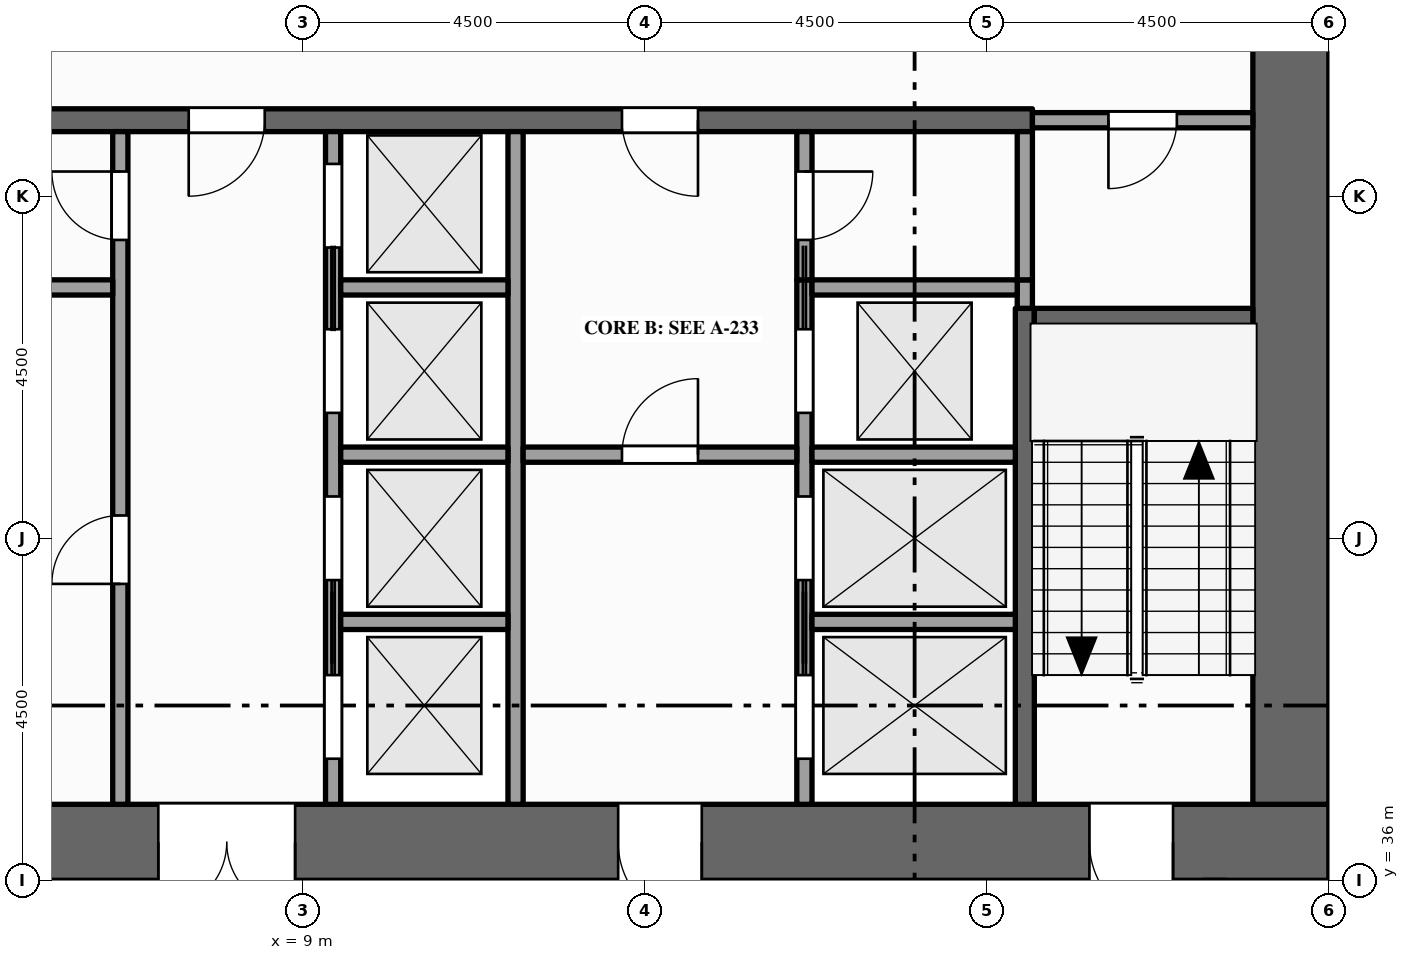
"""IFC4 building model, lengths in metres.
Left out: names, types, materials, properties, quantities, classifications, styles, units other than length and angle.
Written with IfcOpenShell. Run it as: python <this file> out.ifc"""

import sys

from ifc_helpers import new_model, si_unit, direction, frame, frame_2d, origin, place, context, subcontext, project, spatial, rectangle, extrude, element, fill, save


model = new_model("IFC4")
c1 = context("Model", 3, precision=1e-05, world=origin(), true_north=direction((0.0, 1.0)))
c2 = subcontext(c1, "Body", "Model", "MODEL_VIEW")
j1 = project(units=[si_unit("LENGTHUNIT", "METRE"), si_unit("PLANEANGLEUNIT", "RADIAN")], contexts=[c1])
p1 = place(None, origin())
s1 = spatial("IfcSite", under=j1, at=p1, CompositionType="ELEMENT")
p2 = place(p1, origin())
s2 = spatial("IfcBuilding", under=s1, at=p2, CompositionType="ELEMENT")
p3 = place(p2, frame((0.0, 0.0, 183.0)))
s3 = spatial("IfcBuildingStorey", under=s2, at=p3, CompositionType="ELEMENT", Elevation=183.0)
p4 = place(p3, frame((0.0, 36.5, -0.15), z_axis=(0.0, 0.0, 1.0), x_axis=(1.0, 0.0, 0.0)))
e1 = element("IfcWall", 1, at=p4, inside=s3, PredefinedType="SHEAR", context=c2, shape_type="SweptSolid", body=[
    extrude(rectangle(XDim=22.5, YDim=1.0, at=frame_2d((11.25, 0.0))), origin(), (0.0, 0.0, 1.0), 4.0),
])
p5 = place(p4, frame((7.1, 0.0, 0.15)))
e2 = element("IfcOpeningElement", 2, at=p5, cuts=e1, PredefinedType="OPENING", context=c2, shape_type="SweptSolid", body=[
    extrude(rectangle(XDim=1.8, YDim=2.1, at=frame_2d((0.9, 1.05))), frame((0.0, 0.51, 0.0), z_axis=(0.0, -1.0, 0.0), x_axis=(1.0, 0.0, 0.0)), (0.0, 0.0, 1.0), 1.02),
])
p6 = place(p4, frame((13.15, 0.0, 0.15)))
e3 = element("IfcOpeningElement", 3, at=p6, cuts=e1, PredefinedType="OPENING", context=c2, shape_type="SweptSolid", body=[
    extrude(rectangle(XDim=1.1, YDim=2.1, at=frame_2d((0.55, 1.05))), frame((0.0, 0.51, 0.0), z_axis=(0.0, -1.0, 0.0), x_axis=(1.0, 0.0, 0.0)), (0.0, 0.0, 1.0), 1.02),
])
p7 = place(p4, frame((2.15, 0.0, 0.15)))
e4 = element("IfcOpeningElement", 4, at=p7, cuts=e1, PredefinedType="OPENING", context=c2, shape_type="SweptSolid", body=[
    extrude(rectangle(XDim=1.1, YDim=2.1, at=frame_2d((0.55, 1.05))), frame((0.0, 0.51, 0.0), z_axis=(0.0, -1.0, 0.0), x_axis=(1.0, 0.0, 0.0)), (0.0, 0.0, 1.0), 1.02),
])
p8 = place(p4, frame((19.35, 0.0, 0.15)))
e5 = element("IfcOpeningElement", 5, at=p8, cuts=e1, PredefinedType="OPENING", context=c2, shape_type="SweptSolid", body=[
    extrude(rectangle(XDim=1.1, YDim=2.1, at=frame_2d((0.55, 1.05))), frame((0.0, 0.51, 0.0), z_axis=(0.0, -1.0, 0.0), x_axis=(1.0, 0.0, 0.0)), (0.0, 0.0, 1.0), 1.02),
])
p9 = place(p3, frame((22.0, 37.0, -0.15), z_axis=(0.0, 0.0, 1.0), x_axis=(0.0, 1.0, 0.0)))
e6 = element("IfcWall", 6, at=p9, inside=s3, PredefinedType="SHEAR", context=c2, shape_type="SweptSolid", body=[
    extrude(rectangle(XDim=11.5, YDim=1.0, at=frame_2d((5.75, 0.0))), origin(), (0.0, 0.0, 1.0), 4.0),
])
p10 = place(p3, frame((6.6, 37.0, 0.0), z_axis=(0.0, 0.0, 1.0), x_axis=(0.0, 1.0, 0.0)))
e7 = element("IfcWall", 7, at=p10, inside=s3, PredefinedType="PARTITIONING", context=c2, shape_type="SweptSolid", body=[
    extrude(rectangle(XDim=8.85, YDim=0.2, at=frame_2d((4.425, 0.0))), origin(), (0.0, 0.0, 1.0), 3.75),
])
p11 = place(p10, frame((2.9, 0.0, 0.0)))
e8 = element("IfcOpeningElement", 8, at=p11, cuts=e7, PredefinedType="OPENING", context=c2, shape_type="SweptSolid", body=[
    extrude(rectangle(XDim=0.9, YDim=2.1, at=frame_2d((0.45, 1.05))), frame((0.0, 0.11, 0.0), z_axis=(0.0, -1.0, 0.0), x_axis=(1.0, 0.0, 0.0)), (0.0, 0.0, 1.0), 0.22),
])
p12 = place(p10, frame((7.425, 0.0, 0.0)))
e9 = element("IfcOpeningElement", 9, at=p12, cuts=e7, PredefinedType="OPENING", context=c2, shape_type="SweptSolid", body=[
    extrude(rectangle(XDim=0.9, YDim=2.1, at=frame_2d((0.45, 1.05))), frame((0.0, 0.11, 0.0), z_axis=(0.0, -1.0, 0.0), x_axis=(1.0, 0.0, 0.0)), (0.0, 0.0, 1.0), 0.22),
])
p13 = place(p3, frame((9.4, 37.0, 0.0), z_axis=(0.0, 0.0, 1.0), x_axis=(0.0, 1.0, 0.0)))
e10 = element("IfcWall", 10, at=p13, inside=s3, PredefinedType="SOLIDWALL", context=c2, shape_type="SweptSolid", body=[
    extrude(rectangle(XDim=8.85, YDim=0.2, at=frame_2d((4.425, 0.0))), origin(), (0.0, 0.0, 1.0), 3.75),
])
p14 = place(p13, frame((0.6, 0.0, 0.012)))
e11 = element("IfcOpeningElement", 11, at=p14, cuts=e10, PredefinedType="OPENING", context=c2, shape_type="SweptSolid", body=[
    extrude(rectangle(XDim=1.1, YDim=2.1, at=frame_2d((0.55, 1.05))), frame((0.0, 0.11, 0.0), z_axis=(0.0, -1.0, 0.0), x_axis=(1.0, 0.0, 0.0)), (0.0, 0.0, 1.0), 0.22),
])
p15 = place(p13, frame((2.95, 0.0, 0.012)))
e12 = element("IfcOpeningElement", 12, at=p15, cuts=e10, PredefinedType="OPENING", context=c2, shape_type="SweptSolid", body=[
    extrude(rectangle(XDim=1.1, YDim=2.1, at=frame_2d((0.55, 1.05))), frame((0.0, 0.11, 0.0), z_axis=(0.0, -1.0, 0.0), x_axis=(1.0, 0.0, 0.0)), (0.0, 0.0, 1.0), 0.22),
])
p16 = place(p13, frame((5.15, 0.0, 0.012)))
e13 = element("IfcOpeningElement", 13, at=p16, cuts=e10, PredefinedType="OPENING", context=c2, shape_type="SweptSolid", body=[
    extrude(rectangle(XDim=1.1, YDim=2.1, at=frame_2d((0.55, 1.05))), frame((0.0, 0.11, 0.0), z_axis=(0.0, -1.0, 0.0), x_axis=(1.0, 0.0, 0.0)), (0.0, 0.0, 1.0), 0.22),
])
p17 = place(p13, frame((7.325, 0.0, 0.012)))
e14 = element("IfcOpeningElement", 14, at=p17, cuts=e10, PredefinedType="OPENING", context=c2, shape_type="SweptSolid", body=[
    extrude(rectangle(XDim=1.1, YDim=2.1, at=frame_2d((0.55, 1.05))), frame((0.0, 0.11, 0.0), z_axis=(0.0, -1.0, 0.0), x_axis=(1.0, 0.0, 0.0)), (0.0, 0.0, 1.0), 0.22),
])
p18 = place(p3, frame((11.8, 37.0, 0.0), z_axis=(0.0, 0.0, 1.0), x_axis=(0.0, 1.0, 0.0)))
e15 = element("IfcWall", 15, at=p18, inside=s3, PredefinedType="SOLIDWALL", context=c2, shape_type="SweptSolid", body=[
    extrude(rectangle(XDim=8.85, YDim=0.2, at=frame_2d((4.425, 0.0))), origin(), (0.0, 0.0, 1.0), 3.75),
])
p19 = place(p3, frame((15.6, 37.0, 0.0), z_axis=(0.0, 0.0, 1.0), x_axis=(0.0, 1.0, 0.0)))
e16 = element("IfcWall", 16, at=p19, inside=s3, PredefinedType="SOLIDWALL", context=c2, shape_type="SweptSolid", body=[
    extrude(rectangle(XDim=6.9, YDim=0.2, at=frame_2d((3.45, 0.0))), origin(), (0.0, 0.0, 1.0), 3.75),
])
p20 = place(p19, frame((0.6, 0.0, 0.012)))
e17 = element("IfcOpeningElement", 17, at=p20, cuts=e16, PredefinedType="OPENING", context=c2, shape_type="SweptSolid", body=[
    extrude(rectangle(XDim=1.1, YDim=2.1, at=frame_2d((0.55, 1.05))), frame((0.0, 0.11, 0.0), z_axis=(0.0, -1.0, 0.0), x_axis=(1.0, 0.0, 0.0)), (0.0, 0.0, 1.0), 0.22),
])
p21 = place(p19, frame((2.95, 0.0, 0.012)))
e18 = element("IfcOpeningElement", 18, at=p21, cuts=e16, PredefinedType="OPENING", context=c2, shape_type="SweptSolid", body=[
    extrude(rectangle(XDim=1.1, YDim=2.1, at=frame_2d((0.55, 1.05))), frame((0.0, 0.11, 0.0), z_axis=(0.0, -1.0, 0.0), x_axis=(1.0, 0.0, 0.0)), (0.0, 0.0, 1.0), 0.22),
])
p22 = place(p19, frame((5.15, 0.0, 0.012)))
e19 = element("IfcOpeningElement", 19, at=p22, cuts=e16, PredefinedType="OPENING", context=c2, shape_type="SweptSolid", body=[
    extrude(rectangle(XDim=1.1, YDim=2.1, at=frame_2d((0.55, 1.05))), frame((0.0, 0.11, 0.0), z_axis=(0.0, -1.0, 0.0), x_axis=(1.0, 0.0, 0.0)), (0.0, 0.0, 1.0), 0.22),
])
p23 = place(p3, frame((15.6, 43.9, 0.0), z_axis=(0.0, 0.0, 1.0), x_axis=(0.0, 1.0, 0.0)))
e20 = element("IfcWall", 20, at=p23, inside=s3, PredefinedType="PARTITIONING", context=c2, shape_type="SweptSolid", body=[
    extrude(rectangle(XDim=1.95, YDim=0.2, at=frame_2d((0.975, 0.0))), origin(), (0.0, 0.0, 1.0), 3.75),
])
p24 = place(p23, frame((0.525, 0.0, 0.0)))
e21 = element("IfcOpeningElement", 21, at=p24, cuts=e20, PredefinedType="OPENING", context=c2, shape_type="SweptSolid", body=[
    extrude(rectangle(XDim=0.9, YDim=2.1, at=frame_2d((0.45, 1.05))), frame((0.0, 0.11, 0.0), z_axis=(0.0, -1.0, 0.0), x_axis=(1.0, 0.0, 0.0)), (0.0, 0.0, 1.0), 0.22),
])
p25 = place(p3, frame((18.5, 37.0, 0.0), z_axis=(0.0, 0.0, 1.0), x_axis=(0.0, 1.0, 0.0)))
e22 = element("IfcWall", 22, at=p25, inside=s3, PredefinedType="SHEAR", context=c2, shape_type="SweptSolid", body=[
    extrude(rectangle(XDim=6.525, YDim=0.25, at=frame_2d((3.262, 0.0))), origin(), (0.0, 0.0, 1.0), 3.75),
])
p26 = place(p3, frame((18.5, 43.525, 0.0), z_axis=(0.0, 0.0, 1.0), x_axis=(0.0, 1.0, 0.0)))
e23 = element("IfcWall", 23, at=p26, inside=s3, PredefinedType="SOLIDWALL", context=c2, shape_type="SweptSolid", body=[
    extrude(rectangle(XDim=0.375, YDim=0.2, at=frame_2d((0.188, 0.0))), origin(), (0.0, 0.0, 1.0), 3.75),
])
p27 = place(p3, frame((18.5, 43.9, 0.0), z_axis=(0.0, 0.0, 1.0), x_axis=(0.0, 1.0, 0.0)))
e24 = element("IfcWall", 24, at=p27, inside=s3, PredefinedType="PARTITIONING", context=c2, shape_type="SweptSolid", body=[
    extrude(rectangle(XDim=1.95, YDim=0.2, at=frame_2d((0.975, 0.0))), origin(), (0.0, 0.0, 1.0), 3.75),
])
p28 = place(p3, frame((9.5, 39.4, 0.0), z_axis=(0.0, 0.0, 1.0), x_axis=(1.0, 0.0, 0.0)))
e25 = element("IfcWall", 25, at=p28, inside=s3, PredefinedType="SOLIDWALL", context=c2, shape_type="SweptSolid", body=[
    extrude(rectangle(XDim=2.2, YDim=0.2, at=frame_2d((1.1, 0.0))), origin(), (0.0, 0.0, 1.0), 3.75),
])
p29 = place(p3, frame((15.7, 39.4, 0.0), z_axis=(0.0, 0.0, 1.0), x_axis=(1.0, 0.0, 0.0)))
e26 = element("IfcWall", 26, at=p29, inside=s3, PredefinedType="SOLIDWALL", context=c2, shape_type="SweptSolid", body=[
    extrude(rectangle(XDim=2.675, YDim=0.2, at=frame_2d((1.337, 0.0))), origin(), (0.0, 0.0, 1.0), 3.75),
])
p30 = place(p3, frame((9.5, 41.6, 0.0), z_axis=(0.0, 0.0, 1.0), x_axis=(1.0, 0.0, 0.0)))
e27 = element("IfcWall", 27, at=p30, inside=s3, PredefinedType="SOLIDWALL", context=c2, shape_type="SweptSolid", body=[
    extrude(rectangle(XDim=2.2, YDim=0.2, at=frame_2d((1.1, 0.0))), origin(), (0.0, 0.0, 1.0), 3.75),
])
p31 = place(p3, frame((11.9, 41.6, 0.0), z_axis=(0.0, 0.0, 1.0), x_axis=(1.0, 0.0, 0.0)))
e28 = element("IfcWall", 28, at=p31, inside=s3, PredefinedType="PARTITIONING", context=c2, shape_type="SweptSolid", body=[
    extrude(rectangle(XDim=3.6, YDim=0.2, at=frame_2d((1.8, 0.0))), origin(), (0.0, 0.0, 1.0), 3.75),
])
p32 = place(p31, frame((1.3, 0.0, 0.0)))
e29 = element("IfcOpeningElement", 29, at=p32, cuts=e28, PredefinedType="OPENING", context=c2, shape_type="SweptSolid", body=[
    extrude(rectangle(XDim=1.0, YDim=2.1, at=frame_2d((0.5, 1.05))), frame((0.0, 0.11, 0.0), z_axis=(0.0, -1.0, 0.0), x_axis=(1.0, 0.0, 0.0)), (0.0, 0.0, 1.0), 0.22),
])
p33 = place(p3, frame((15.7, 41.6, 0.0), z_axis=(0.0, 0.0, 1.0), x_axis=(1.0, 0.0, 0.0)))
e30 = element("IfcWall", 30, at=p33, inside=s3, PredefinedType="SOLIDWALL", context=c2, shape_type="SweptSolid", body=[
    extrude(rectangle(XDim=2.675, YDim=0.2, at=frame_2d((1.337, 0.0))), origin(), (0.0, 0.0, 1.0), 3.75),
])
p34 = place(p3, frame((18.625, 43.4, 0.0), z_axis=(0.0, 0.0, 1.0), x_axis=(1.0, 0.0, 0.0)))
e31 = element("IfcWall", 31, at=p34, inside=s3, PredefinedType="SHEAR", context=c2, shape_type="SweptSolid", body=[
    extrude(rectangle(XDim=2.875, YDim=0.25, at=frame_2d((1.438, 0.0))), origin(), (0.0, 0.0, 1.0), 3.75),
])
p35 = place(p3, frame((4.3, 43.8, 0.0), z_axis=(0.0, 0.0, 1.0), x_axis=(1.0, 0.0, 0.0)))
e32 = element("IfcWall", 32, at=p35, inside=s3, PredefinedType="PARTITIONING", context=c2, shape_type="SweptSolid", body=[
    extrude(rectangle(XDim=2.2, YDim=0.2, at=frame_2d((1.1, 0.0))), origin(), (0.0, 0.0, 1.0), 3.75),
])
p36 = place(p3, frame((9.5, 43.8, 0.0), z_axis=(0.0, 0.0, 1.0), x_axis=(1.0, 0.0, 0.0)))
e33 = element("IfcWall", 33, at=p36, inside=s3, PredefinedType="SOLIDWALL", context=c2, shape_type="SweptSolid", body=[
    extrude(rectangle(XDim=2.2, YDim=0.2, at=frame_2d((1.1, 0.0))), origin(), (0.0, 0.0, 1.0), 3.75),
])
p37 = place(p3, frame((15.7, 43.8, 0.0), z_axis=(0.0, 0.0, 1.0), x_axis=(1.0, 0.0, 0.0)))
e34 = element("IfcWall", 34, at=p37, inside=s3, PredefinedType="SOLIDWALL", context=c2, shape_type="SweptSolid", body=[
    extrude(rectangle(XDim=2.7, YDim=0.2, at=frame_2d((1.35, 0.0))), origin(), (0.0, 0.0, 1.0), 3.75),
])
p38 = place(p3, frame((4.1, 46.0, 0.0), z_axis=(0.0, 0.0, 1.0), x_axis=(1.0, 0.0, 0.0)))
e35 = element("IfcWall", 35, at=p38, inside=s3, PredefinedType="SHEAR", context=c2, shape_type="SweptSolid", body=[
    extrude(rectangle(XDim=14.5, YDim=0.3, at=frame_2d((7.25, 0.0))), origin(), (0.0, 0.0, 1.0), 3.75),
])
p39 = place(p38, frame((3.4, 0.0, 0.0)))
e36 = element("IfcOpeningElement", 36, at=p39, cuts=e35, PredefinedType="OPENING", context=c2, shape_type="SweptSolid", body=[
    extrude(rectangle(XDim=1.0, YDim=2.1, at=frame_2d((0.5, 1.05))), frame((0.0, 0.16, 0.0), z_axis=(0.0, -1.0, 0.0), x_axis=(1.0, 0.0, 0.0)), (0.0, 0.0, 1.0), 0.32),
])
p40 = place(p38, frame((9.1, 0.0, 0.0)))
e37 = element("IfcOpeningElement", 37, at=p40, cuts=e35, PredefinedType="OPENING", context=c2, shape_type="SweptSolid", body=[
    extrude(rectangle(XDim=1.0, YDim=2.1, at=frame_2d((0.5, 1.05))), frame((0.0, 0.16, 0.0), z_axis=(0.0, -1.0, 0.0), x_axis=(1.0, 0.0, 0.0)), (0.0, 0.0, 1.0), 0.32),
])
p41 = place(p3, frame((18.6, 46.0, 0.0), z_axis=(0.0, 0.0, 1.0), x_axis=(1.0, 0.0, 0.0)))
e38 = element("IfcWall", 38, at=p41, inside=s3, PredefinedType="PARTITIONING", context=c2, shape_type="SweptSolid", body=[
    extrude(rectangle(XDim=2.9, YDim=0.2, at=frame_2d((1.45, 0.0))), origin(), (0.0, 0.0, 1.0), 3.75),
])
p42 = place(p41, frame((1.0, 0.0, 0.0)))
e39 = element("IfcOpeningElement", 39, at=p42, cuts=e38, PredefinedType="OPENING", context=c2, shape_type="SweptSolid", body=[
    extrude(rectangle(XDim=0.9, YDim=2.1, at=frame_2d((0.45, 1.05))), frame((0.0, 0.11, 0.0), z_axis=(0.0, -1.0, 0.0), x_axis=(1.0, 0.0, 0.0)), (0.0, 0.0, 1.0), 0.22),
])
p43 = place(p14, origin())
e40 = element("IfcDoor", 40, at=p43, inside=s3, OperationType="SLIDING_TO_RIGHT", PredefinedType="DOOR", context=c2, shape_type="SweptSolid", body=[
    extrude(rectangle(XDim=1.1, YDim=2.1, at=frame_2d((0.55, 1.05))), frame((0.0, 0.025, 0.0), z_axis=(0.0, -1.0, 0.0), x_axis=(1.0, 0.0, 0.0)), (0.0, 0.0, 1.0), 0.05),
])
fill(e11, e40)
p44 = place(p15, origin())
e41 = element("IfcDoor", 41, at=p44, inside=s3, OperationType="SLIDING_TO_LEFT", PredefinedType="DOOR", context=c2, shape_type="SweptSolid", body=[
    extrude(rectangle(XDim=1.1, YDim=2.1, at=frame_2d((0.55, 1.05))), frame((0.0, 0.025, 0.0), z_axis=(0.0, -1.0, 0.0), x_axis=(1.0, 0.0, 0.0)), (0.0, 0.0, 1.0), 0.05),
])
fill(e12, e41)
p45 = place(p16, origin())
e42 = element("IfcDoor", 42, at=p45, inside=s3, OperationType="SLIDING_TO_RIGHT", PredefinedType="DOOR", context=c2, shape_type="SweptSolid", body=[
    extrude(rectangle(XDim=1.1, YDim=2.1, at=frame_2d((0.55, 1.05))), frame((0.0, 0.025, 0.0), z_axis=(0.0, -1.0, 0.0), x_axis=(1.0, 0.0, 0.0)), (0.0, 0.0, 1.0), 0.05),
])
fill(e13, e42)
p46 = place(p17, origin())
e43 = element("IfcDoor", 43, at=p46, inside=s3, OperationType="SLIDING_TO_LEFT", PredefinedType="DOOR", context=c2, shape_type="SweptSolid", body=[
    extrude(rectangle(XDim=1.1, YDim=2.1, at=frame_2d((0.55, 1.05))), frame((0.0, 0.025, 0.0), z_axis=(0.0, -1.0, 0.0), x_axis=(1.0, 0.0, 0.0)), (0.0, 0.0, 1.0), 0.05),
])
fill(e14, e43)
p47 = place(p20, origin())
e44 = element("IfcDoor", 44, at=p47, inside=s3, OperationType="SLIDING_TO_RIGHT", PredefinedType="DOOR", context=c2, shape_type="SweptSolid", body=[
    extrude(rectangle(XDim=1.1, YDim=2.1, at=frame_2d((0.55, 1.05))), frame((0.0, 0.025, 0.0), z_axis=(0.0, -1.0, 0.0), x_axis=(1.0, 0.0, 0.0)), (0.0, 0.0, 1.0), 0.05),
])
fill(e17, e44)
p48 = place(p21, origin())
e45 = element("IfcDoor", 45, at=p48, inside=s3, OperationType="SLIDING_TO_LEFT", PredefinedType="DOOR", context=c2, shape_type="SweptSolid", body=[
    extrude(rectangle(XDim=1.1, YDim=2.1, at=frame_2d((0.55, 1.05))), frame((0.0, 0.025, 0.0), z_axis=(0.0, -1.0, 0.0), x_axis=(1.0, 0.0, 0.0)), (0.0, 0.0, 1.0), 0.05),
])
fill(e18, e45)
p49 = place(p22, origin())
e46 = element("IfcDoor", 46, at=p49, inside=s3, OperationType="SLIDING_TO_RIGHT", PredefinedType="DOOR", context=c2, shape_type="SweptSolid", body=[
    extrude(rectangle(XDim=1.1, YDim=2.1, at=frame_2d((0.55, 1.05))), frame((0.0, 0.025, 0.0), z_axis=(0.0, -1.0, 0.0), x_axis=(1.0, 0.0, 0.0)), (0.0, 0.0, 1.0), 0.05),
])
fill(e19, e46)
p50 = place(p5, origin())
e47 = element("IfcDoor", 47, at=p50, inside=s3, OperationType="DOUBLE_DOOR_SINGLE_SWING", PredefinedType="DOOR", context=c2, shape_type="SweptSolid", body=[
    extrude(rectangle(XDim=1.8, YDim=2.1, at=frame_2d((0.9, 1.05))), frame((0.0, 0.025, 0.0), z_axis=(0.0, -1.0, 0.0), x_axis=(1.0, 0.0, 0.0)), (0.0, 0.0, 1.0), 0.05),
])
fill(e2, e47)
p51 = place(p39, origin())
e48 = element("IfcDoor", 48, at=p51, inside=s3, OperationType="SINGLE_SWING_LEFT", PredefinedType="DOOR", context=c2, shape_type="SweptSolid", body=[
    extrude(rectangle(XDim=1.0, YDim=2.1, at=frame_2d((0.5, 1.05))), frame((0.0, 0.025, 0.0), z_axis=(0.0, -1.0, 0.0), x_axis=(1.0, 0.0, 0.0)), (0.0, 0.0, 1.0), 0.05),
])
fill(e36, e48)
p52 = place(p6, origin())
e49 = element("IfcDoor", 49, at=p52, inside=s3, OperationType="SINGLE_SWING_RIGHT", PredefinedType="DOOR", context=c2, shape_type="SweptSolid", body=[
    extrude(rectangle(XDim=1.1, YDim=2.1, at=frame_2d((0.55, 1.05))), frame((0.0, 0.025, 0.0), z_axis=(0.0, -1.0, 0.0), x_axis=(1.0, 0.0, 0.0)), (0.0, 0.0, 1.0), 0.05),
])
fill(e3, e49)
p53 = place(p32, origin())
e50 = element("IfcDoor", 50, at=p53, inside=s3, OperationType="SINGLE_SWING_RIGHT", PredefinedType="DOOR", context=c2, shape_type="SweptSolid", body=[
    extrude(rectangle(XDim=1.0, YDim=2.1, at=frame_2d((0.5, 1.05))), frame((0.0, 0.025, 0.0), z_axis=(0.0, -1.0, 0.0), x_axis=(1.0, 0.0, 0.0)), (0.0, 0.0, 1.0), 0.05),
])
fill(e29, e50)
p54 = place(p40, origin())
e51 = element("IfcDoor", 51, at=p54, inside=s3, OperationType="SINGLE_SWING_RIGHT", PredefinedType="DOOR", context=c2, shape_type="SweptSolid", body=[
    extrude(rectangle(XDim=1.0, YDim=2.1, at=frame_2d((0.5, 1.05))), frame((0.0, 0.025, 0.0), z_axis=(0.0, -1.0, 0.0), x_axis=(1.0, 0.0, 0.0)), (0.0, 0.0, 1.0), 0.05),
])
fill(e37, e51)
p55 = place(p8, origin())
e52 = element("IfcDoor", 52, at=p55, inside=s3, OperationType="SINGLE_SWING_RIGHT", PredefinedType="DOOR", context=c2, shape_type="SweptSolid", body=[
    extrude(rectangle(XDim=1.1, YDim=2.1, at=frame_2d((0.55, 1.05))), frame((0.0, 0.025, 0.0), z_axis=(0.0, -1.0, 0.0), x_axis=(1.0, 0.0, 0.0)), (0.0, 0.0, 1.0), 0.05),
])
fill(e5, e52)
p56 = place(p42, origin())
e53 = element("IfcDoor", 53, at=p56, inside=s3, OperationType="SINGLE_SWING_LEFT", PredefinedType="DOOR", context=c2, shape_type="SweptSolid", body=[
    extrude(rectangle(XDim=0.9, YDim=2.1, at=frame_2d((0.45, 1.05))), frame((0.0, 0.025, 0.0), z_axis=(0.0, -1.0, 0.0), x_axis=(1.0, 0.0, 0.0)), (0.0, 0.0, 1.0), 0.05),
])
fill(e39, e53)
p57 = place(p11, origin())
e54 = element("IfcDoor", 54, at=p57, inside=s3, OperationType="SINGLE_SWING_LEFT", PredefinedType="DOOR", context=c2, shape_type="SweptSolid", body=[
    extrude(rectangle(XDim=0.9, YDim=2.1, at=frame_2d((0.45, 1.05))), frame((0.0, 0.025, 0.0), z_axis=(0.0, -1.0, 0.0), x_axis=(1.0, 0.0, 0.0)), (0.0, 0.0, 1.0), 0.05),
])
fill(e8, e54)
p58 = place(p12, origin())
e55 = element("IfcDoor", 55, at=p58, inside=s3, OperationType="SINGLE_SWING_RIGHT", PredefinedType="DOOR", context=c2, shape_type="SweptSolid", body=[
    extrude(rectangle(XDim=0.9, YDim=2.1, at=frame_2d((0.45, 1.05))), frame((0.0, 0.025, 0.0), z_axis=(0.0, -1.0, 0.0), x_axis=(1.0, 0.0, 0.0)), (0.0, 0.0, 1.0), 0.05),
])
fill(e9, e55)
p59 = place(p24, origin())
e56 = element("IfcDoor", 56, at=p59, inside=s3, OperationType="SINGLE_SWING_RIGHT", PredefinedType="DOOR", context=c2, shape_type="SweptSolid", body=[
    extrude(rectangle(XDim=0.9, YDim=2.1, at=frame_2d((0.45, 1.05))), frame((0.0, 0.025, 0.0), z_axis=(0.0, -1.0, 0.0), x_axis=(1.0, 0.0, 0.0)), (0.0, 0.0, 1.0), 0.05),
])
fill(e21, e56)
save(model, sys.argv[1])
